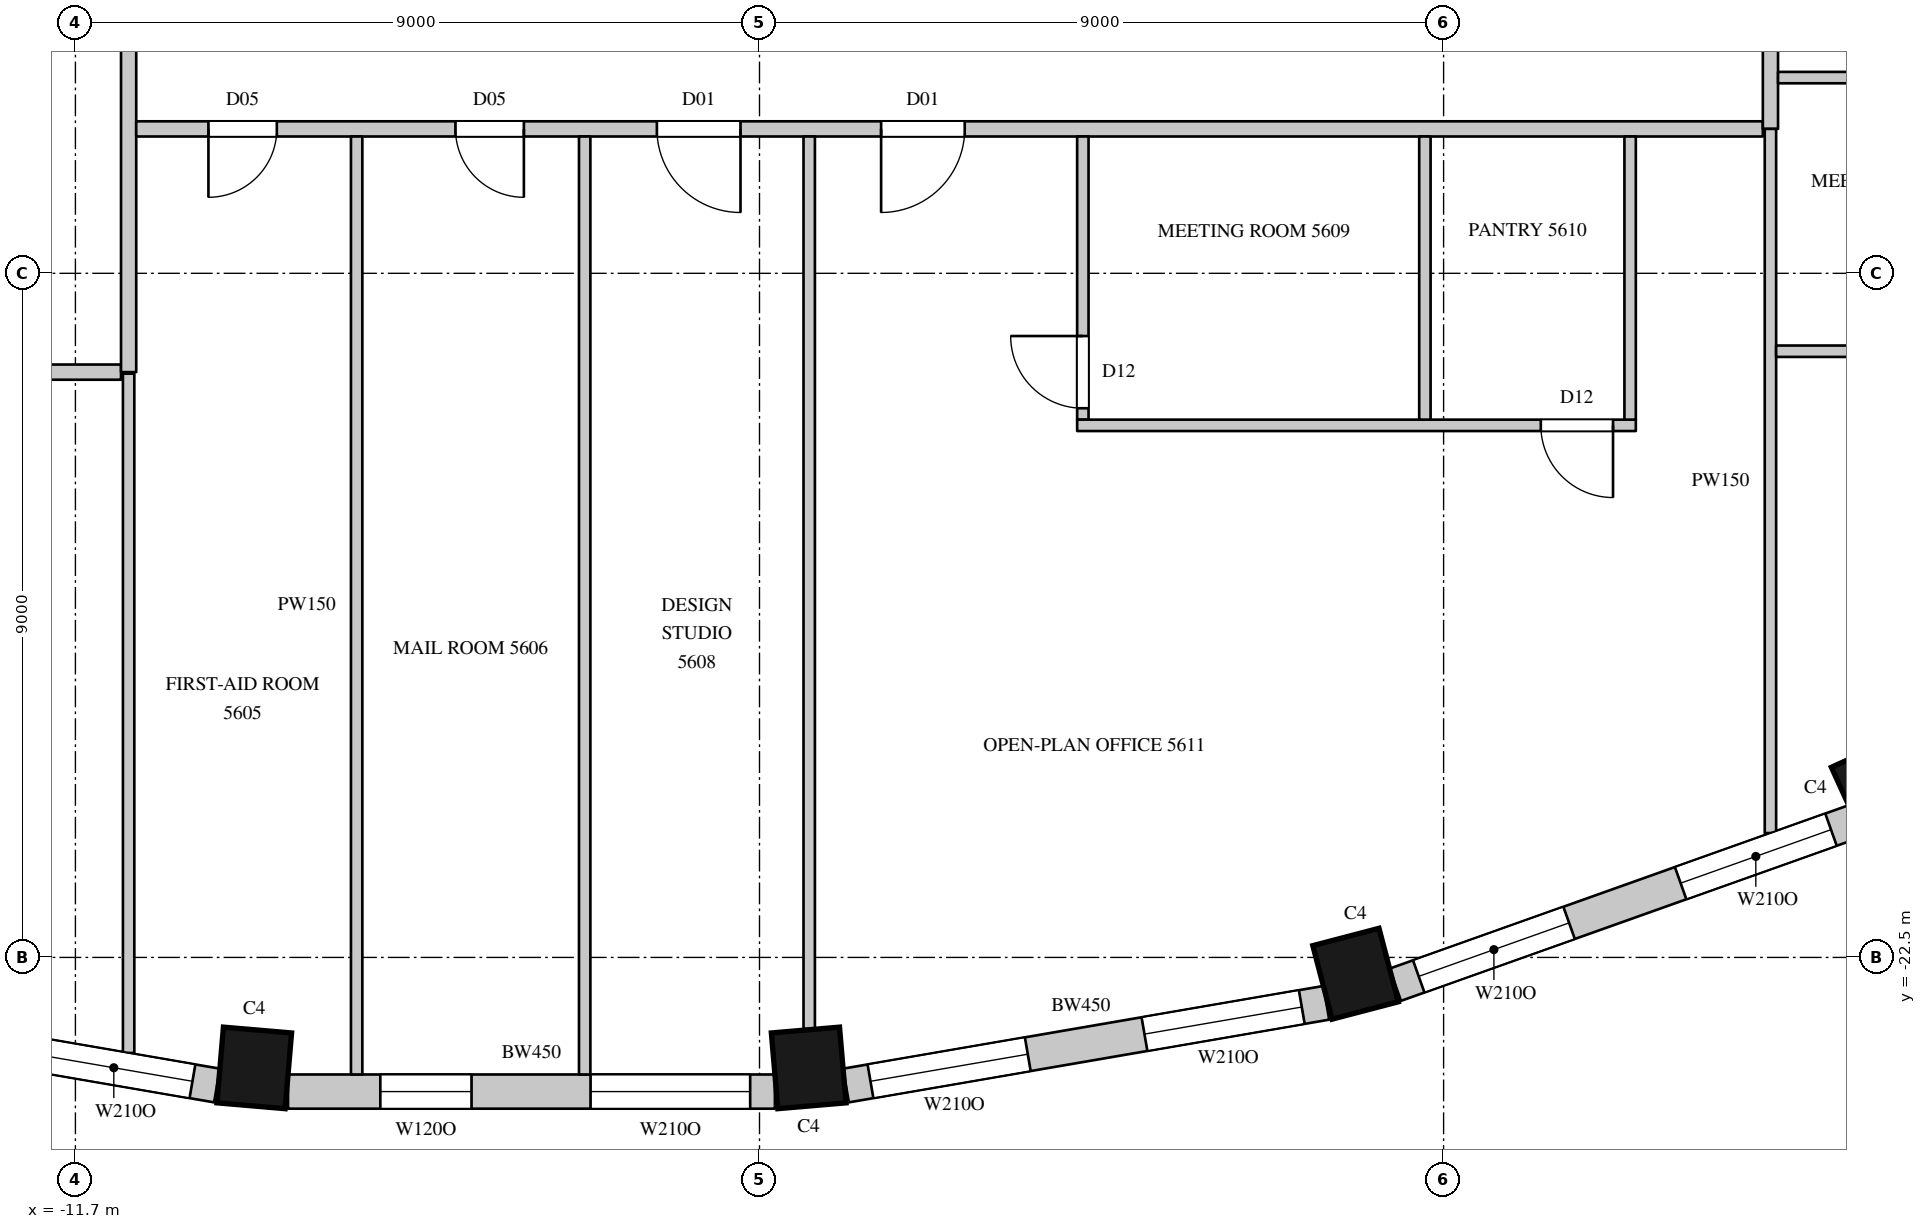
"""IFC4 building model, lengths in metres.
Left out: names, types, materials, properties, quantities, classifications, styles, units other than length and angle.
Written with IfcOpenShell. Run it as: python <this file> out.ifc"""

import sys

from ifc_helpers import new_model, si_unit, direction, frame, frame_2d, origin, origin_2d, place, context, subcontext, project, spatial, rectangle, extrude, element, fill, save


model = new_model("IFC4")
c1 = context("Model", 3, precision=1e-05, world=origin(), true_north=direction((0.0, 1.0)))
c2 = subcontext(c1, "Body", "Model", "MODEL_VIEW")
j1 = project(units=[si_unit("LENGTHUNIT", "METRE"), si_unit("PLANEANGLEUNIT", "RADIAN")], contexts=[c1])
p1 = place(None, origin())
s1 = spatial("IfcSite", under=j1, at=p1, CompositionType="ELEMENT")
p2 = place(p1, origin())
s2 = spatial("IfcBuilding", under=s1, at=p2, CompositionType="ELEMENT")
p3 = place(p2, frame((0.0, 0.0, 251.6)))
s3 = spatial("IfcBuildingStorey", under=s2, at=p3, CompositionType="ELEMENT", Elevation=251.6)
for number, where, z_axis, x_axis in (
    (1, (-9.347, -23.954, 0.0), (0.0, 0.0, 1.0), (0.996, -0.085, 0.0)),
    (2, (-2.053, -23.954, 0.0), (0.0, 0.0, 1.0), (0.996, 0.085, 0.0)),
    (3, (5.142, -22.715, 0.0), (0.0, 0.0, 1.0), (0.967, 0.253, 0.0)),
    (4, (12.019, -20.267, 0.0), (0.0, 0.0, 1.0), (0.91, 0.415, 0.0)),
):
    element("IfcColumn", number, at=place(p3, frame(where, z_axis=z_axis, x_axis=x_axis)), inside=s3, PredefinedType="COLUMN", context=c2, shape_type="SweptSolid", body=[
        extrude(rectangle(XDim=0.9, YDim=1.0, at=origin_2d()), origin(), (0.0, 0.0, 1.0), 4.1),
    ])
p4 = place(p3, frame((-16.157, -23.097, 0.0), z_axis=(0.0, 0.0, 1.0), x_axis=(0.985502073964, -0.169663379113, 0.0)))
e5 = element("IfcWall", 5, at=p4, inside=s3, PredefinedType="SOLIDWALL", context=c2, shape_type="SweptSolid", body=[
    extrude(rectangle(XDim=6.412, YDim=0.45, at=frame_2d((3.206, 0.0))), origin(), (0.0, 0.0, 1.0), 3.8),
])
p5 = place(p4, frame((0.327, 0.0, 1.05)))
e6 = element("IfcOpeningElement", 6, at=p5, cuts=e5, PredefinedType="OPENING", context=c2, shape_type="SweptSolid", body=[
    extrude(rectangle(XDim=2.1, YDim=2.4, at=frame_2d((1.05, 1.2))), frame((0.0, 0.235, 0.0), z_axis=(0.0, -1.0, 0.0), x_axis=(1.0, 0.0, 0.0)), (0.0, 0.0, 1.0), 0.47),
])
p6 = place(p4, frame((3.985, 0.0, 1.05)))
e7 = element("IfcOpeningElement", 7, at=p6, cuts=e5, PredefinedType="OPENING", context=c2, shape_type="SweptSolid", body=[
    extrude(rectangle(XDim=2.1, YDim=2.4, at=frame_2d((1.05, 1.2))), frame((0.0, 0.235, 0.0), z_axis=(0.0, -1.0, 0.0), x_axis=(1.0, 0.0, 0.0)), (0.0, 0.0, 1.0), 0.47),
])
p7 = place(p3, frame((-8.903, -24.265, 0.0), z_axis=(0.0, 0.0, 1.0), x_axis=(1.0, 0.0, 0.0)))
e8 = element("IfcWall", 8, at=p7, inside=s3, PredefinedType="SOLIDWALL", context=c2, shape_type="SweptSolid", body=[
    extrude(rectangle(XDim=6.406, YDim=0.45, at=frame_2d((3.203, 0.0))), origin(), (0.0, 0.0, 1.0), 3.8),
])
p8 = place(p7, frame((3.98, 0.0, 1.05)))
e9 = element("IfcOpeningElement", 9, at=p8, cuts=e8, PredefinedType="OPENING", context=c2, shape_type="SweptSolid", body=[
    extrude(rectangle(XDim=2.1, YDim=2.4, at=frame_2d((1.05, 1.2))), frame((0.0, 0.235, 0.0), z_axis=(0.0, -1.0, 0.0), x_axis=(1.0, 0.0, 0.0)), (0.0, 0.0, 1.0), 0.47),
])
p9 = place(p7, frame((1.214, 0.0, 1.05)))
e10 = element("IfcOpeningElement", 10, at=p9, cuts=e8, PredefinedType="OPENING", context=c2, shape_type="SweptSolid", body=[
    extrude(rectangle(XDim=1.2, YDim=2.4, at=frame_2d((0.6, 1.2))), frame((0.0, 0.235, 0.0), z_axis=(0.0, -1.0, 0.0), x_axis=(1.0, 0.0, 0.0)), (0.0, 0.0, 1.0), 0.47),
])
p10 = place(p3, frame((-1.562, -24.185, 0.0), z_axis=(0.0, 0.0, 1.0), x_axis=(0.985502073964, 0.169663379113, 0.0)))
e11 = element("IfcWall", 11, at=p10, inside=s3, PredefinedType="SOLIDWALL", context=c2, shape_type="SweptSolid", body=[
    extrude(rectangle(XDim=6.412, YDim=0.45, at=frame_2d((3.206, 0.0))), origin(), (0.0, 0.0, 1.0), 3.8),
])
p11 = place(p10, frame((0.327, 0.0, 1.05)))
e12 = element("IfcOpeningElement", 12, at=p11, cuts=e11, PredefinedType="OPENING", context=c2, shape_type="SweptSolid", body=[
    extrude(rectangle(XDim=2.1, YDim=2.4, at=frame_2d((1.05, 1.2))), frame((0.0, 0.235, 0.0), z_axis=(0.0, -1.0, 0.0), x_axis=(1.0, 0.0, 0.0)), (0.0, 0.0, 1.0), 0.47),
])
p12 = place(p10, frame((3.985, 0.0, 1.05)))
e13 = element("IfcOpeningElement", 13, at=p12, cuts=e11, PredefinedType="OPENING", context=c2, shape_type="SweptSolid", body=[
    extrude(rectangle(XDim=2.1, YDim=2.4, at=frame_2d((1.05, 1.2))), frame((0.0, 0.235, 0.0), z_axis=(0.0, -1.0, 0.0), x_axis=(1.0, 0.0, 0.0)), (0.0, 0.0, 1.0), 0.47),
])
p13 = place(p3, frame((5.665, -22.859, 0.0), z_axis=(0.0, 0.0, 1.0), x_axis=(0.942108340262, 0.335308626803, 0.0)))
e14 = element("IfcWall", 14, at=p13, inside=s3, PredefinedType="SOLIDWALL", context=c2, shape_type="SweptSolid", body=[
    extrude(rectangle(XDim=6.412, YDim=0.45, at=frame_2d((3.206, 0.0))), origin(), (0.0, 0.0, 1.0), 3.8),
])
p14 = place(p13, frame((0.327, 0.0, 1.05)))
e15 = element("IfcOpeningElement", 15, at=p14, cuts=e14, PredefinedType="OPENING", context=c2, shape_type="SweptSolid", body=[
    extrude(rectangle(XDim=2.1, YDim=2.4, at=frame_2d((1.05, 1.2))), frame((0.0, 0.235, 0.0), z_axis=(0.0, -1.0, 0.0), x_axis=(1.0, 0.0, 0.0)), (0.0, 0.0, 1.0), 0.47),
])
p15 = place(p13, frame((3.985, 0.0, 1.05)))
e16 = element("IfcOpeningElement", 16, at=p15, cuts=e14, PredefinedType="OPENING", context=c2, shape_type="SweptSolid", body=[
    extrude(rectangle(XDim=2.1, YDim=2.4, at=frame_2d((1.05, 1.2))), frame((0.0, 0.235, 0.0), z_axis=(0.0, -1.0, 0.0), x_axis=(1.0, 0.0, 0.0)), (0.0, 0.0, 1.0), 0.47),
])
p16 = place(p3, frame((-13.97, -14.8, 0.0), z_axis=(0.0, 0.0, 1.0), x_axis=(1.0, 0.0, 0.0)))
e17 = element("IfcWall", 17, at=p16, inside=s3, PredefinedType="PARTITIONING", context=c2, shape_type="SweptSolid", body=[
    extrude(rectangle(XDim=2.87, YDim=0.2, at=frame_2d((1.435, 0.0))), origin(), (0.0, 0.0, 1.0), 3.8),
])
p17 = place(p3, frame((-11.0, -14.8, 0.0), z_axis=(0.0, 0.0, 1.0), x_axis=(0.0, 1.0, 0.0)))
e18 = element("IfcWall", 18, at=p17, inside=s3, PredefinedType="PARTITIONING", context=c2, shape_type="SweptSolid", body=[
    extrude(rectangle(XDim=29.6, YDim=0.2, at=frame_2d((14.8, 0.0))), origin(), (0.0, 0.0, 1.0), 3.8),
])
p18 = place(p17, frame((14.35, 0.0, 0.0)))
e19 = element("IfcOpeningElement", 19, at=p18, cuts=e18, PredefinedType="OPENING", context=c2, shape_type="SweptSolid", body=[
    extrude(rectangle(XDim=1.5, YDim=2.4, at=frame_2d((0.75, 1.2))), frame((0.0, 0.11, 0.0), z_axis=(0.0, -1.0, 0.0), x_axis=(1.0, 0.0, 0.0)), (0.0, 0.0, 1.0), 0.22),
])
p19 = place(p3, frame((-10.9, -11.6, 0.0), z_axis=(0.0, 0.0, 1.0), x_axis=(1.0, 0.0, 0.0)))
e20 = element("IfcWall", 20, at=p19, inside=s3, PredefinedType="PARTITIONING", context=c2, shape_type="SweptSolid", body=[
    extrude(rectangle(XDim=21.4, YDim=0.2, at=frame_2d((10.7, 0.0))), origin(), (0.0, 0.0, 1.0), 3.8),
])
p20 = place(p19, frame((0.95, 0.0, 0.0)))
e21 = element("IfcOpeningElement", 21, at=p20, cuts=e20, PredefinedType="OPENING", context=c2, shape_type="SweptSolid", body=[
    extrude(rectangle(XDim=0.9, YDim=2.2, at=frame_2d((0.45, 1.1))), frame((0.0, 0.11, 0.0), z_axis=(0.0, -1.0, 0.0), x_axis=(1.0, 0.0, 0.0)), (0.0, 0.0, 1.0), 0.22),
])
p21 = place(p19, frame((4.2, 0.0, 0.0)))
e22 = element("IfcOpeningElement", 22, at=p21, cuts=e20, PredefinedType="OPENING", context=c2, shape_type="SweptSolid", body=[
    extrude(rectangle(XDim=0.9, YDim=2.2, at=frame_2d((0.45, 1.1))), frame((0.0, 0.11, 0.0), z_axis=(0.0, -1.0, 0.0), x_axis=(1.0, 0.0, 0.0)), (0.0, 0.0, 1.0), 0.22),
])
p22 = place(p19, frame((6.85, 0.0, 0.0)))
e23 = element("IfcOpeningElement", 23, at=p22, cuts=e20, PredefinedType="OPENING", context=c2, shape_type="SweptSolid", body=[
    extrude(rectangle(XDim=1.1, YDim=2.4, at=frame_2d((0.55, 1.2))), frame((0.0, 0.11, 0.0), z_axis=(0.0, -1.0, 0.0), x_axis=(1.0, 0.0, 0.0)), (0.0, 0.0, 1.0), 0.22),
])
p23 = place(p19, frame((9.8, 0.0, 0.0)))
e24 = element("IfcOpeningElement", 24, at=p23, cuts=e20, PredefinedType="OPENING", context=c2, shape_type="SweptSolid", body=[
    extrude(rectangle(XDim=1.1, YDim=2.4, at=frame_2d((0.55, 1.2))), frame((0.0, 0.11, 0.0), z_axis=(0.0, -1.0, 0.0), x_axis=(1.0, 0.0, 0.0)), (0.0, 0.0, 1.0), 0.22),
])
p24 = place(p3, frame((10.6, -11.6, 0.0), z_axis=(0.0, 0.0, 1.0), x_axis=(0.0, 1.0, 0.0)))
e25 = element("IfcWall", 25, at=p24, inside=s3, PredefinedType="PARTITIONING", context=c2, shape_type="SweptSolid", body=[
    extrude(rectangle(XDim=23.7, YDim=0.2, at=frame_2d((11.85, 0.0))), origin(), (0.0, 0.0, 1.0), 3.8),
])
p25 = place(p24, frame((9.45, 0.0, 0.0)))
e26 = element("IfcOpeningElement", 26, at=p25, cuts=e25, PredefinedType="OPENING", context=c2, shape_type="SweptSolid", body=[
    extrude(rectangle(XDim=1.5, YDim=2.4, at=frame_2d((0.75, 1.2))), frame((0.0, 0.11, 0.0), z_axis=(0.0, -1.0, 0.0), x_axis=(1.0, 0.0, 0.0)), (0.0, 0.0, 1.0), 0.22),
])
p26 = place(p24, frame((19.45, 0.0, 0.0)))
e27 = element("IfcOpeningElement", 27, at=p26, cuts=e25, PredefinedType="OPENING", context=c2, shape_type="SweptSolid", body=[
    extrude(rectangle(XDim=1.1, YDim=2.4, at=frame_2d((0.55, 1.2))), frame((0.0, 0.11, 0.0), z_axis=(0.0, -1.0, 0.0), x_axis=(1.0, 0.0, 0.0)), (0.0, 0.0, 1.0), 0.22),
])
p27 = place(p24, frame((4.6, 0.0, 0.0)))
e28 = element("IfcOpeningElement", 28, at=p27, cuts=e25, PredefinedType="OPENING", context=c2, shape_type="SweptSolid", body=[
    extrude(rectangle(XDim=1.1, YDim=2.4, at=frame_2d((0.55, 1.2))), frame((0.0, 0.11, 0.0), z_axis=(0.0, -1.0, 0.0), x_axis=(1.0, 0.0, 0.0)), (0.0, 0.0, 1.0), 0.22),
])
p28 = place(p3, frame((-11.0, -23.757, 0.0), z_axis=(0.0, 0.0, 1.0), x_axis=(0.0, 1.0, 0.0)))
e29 = element("IfcWall", 29, at=p28, inside=s3, PredefinedType="PARTITIONING", context=c2, shape_type="SweptSolid", body=[
    extrude(rectangle(XDim=8.937, YDim=0.15, at=frame_2d((4.468, 0.0))), origin(), (0.0, 0.0, 1.0), 3.8),
])
for number, where, z_axis, x_axis in (
    (30, (-8.0, -24.04, 0.0), (0.0, 0.0, 1.0), (0.0, 1.0, 0.0)),
    (31, (-5.0, -24.04, 0.0), (0.0, 0.0, 1.0), (0.0, 1.0, 0.0)),
):
    element("IfcWall", number, at=place(p3, frame(where, z_axis=z_axis, x_axis=x_axis)), inside=s3, PredefinedType="PARTITIONING", context=c2, shape_type="SweptSolid", body=[
        extrude(rectangle(XDim=12.34, YDim=0.15, at=frame_2d((6.17, 0.0))), origin(), (0.0, 0.0, 1.0), 3.8),
    ])
p29 = place(p3, frame((-2.046, -23.441, 0.0), z_axis=(0.0, 0.0, 1.0), x_axis=(0.0, 1.0, 0.0)))
e32 = element("IfcWall", 32, at=p29, inside=s3, PredefinedType="PARTITIONING", context=c2, shape_type="SweptSolid", body=[
    extrude(rectangle(XDim=11.741, YDim=0.15, at=frame_2d((5.871, 0.0))), origin(), (0.0, 0.0, 1.0), 3.8),
])
p30 = place(p3, frame((1.554, -15.425, 0.0), z_axis=(0.0, 0.0, 1.0), x_axis=(0.0, 1.0, 0.0)))
e33 = element("IfcWall", 33, at=p30, inside=s3, PredefinedType="PARTITIONING", context=c2, shape_type="SweptSolid", body=[
    extrude(rectangle(XDim=3.725, YDim=0.15, at=frame_2d((1.863, 0.0))), origin(), (0.0, 0.0, 1.0), 3.8),
])
p31 = place(p30, frame((0.15, 0.0, 0.0)))
e34 = element("IfcOpeningElement", 34, at=p31, cuts=e33, PredefinedType="OPENING", context=c2, shape_type="SweptSolid", body=[
    extrude(rectangle(XDim=0.95, YDim=2.2, at=frame_2d((0.475, 1.1))), frame((0.0, 0.085, 0.0), z_axis=(0.0, -1.0, 0.0), x_axis=(1.0, 0.0, 0.0)), (0.0, 0.0, 1.0), 0.17),
])
p32 = place(p3, frame((1.479, -15.5, 0.0), z_axis=(0.0, 0.0, 1.0), x_axis=(1.0, 0.0, 0.0)))
e35 = element("IfcWall", 35, at=p32, inside=s3, PredefinedType="PARTITIONING", context=c2, shape_type="SweptSolid", body=[
    extrude(rectangle(XDim=7.35, YDim=0.15, at=frame_2d((3.675, 0.0))), origin(), (0.0, 0.0, 1.0), 3.8),
])
p33 = place(p32, frame((6.1, 0.0, 0.0)))
e36 = element("IfcOpeningElement", 36, at=p33, cuts=e35, PredefinedType="OPENING", context=c2, shape_type="SweptSolid", body=[
    extrude(rectangle(XDim=0.95, YDim=2.2, at=frame_2d((0.475, 1.1))), frame((0.0, 0.085, 0.0), z_axis=(0.0, -1.0, 0.0), x_axis=(1.0, 0.0, 0.0)), (0.0, 0.0, 1.0), 0.17),
])
for number, where, z_axis, x_axis in (
    (37, (6.054, -15.425, 0.0), (0.0, 0.0, 1.0), (0.0, 1.0, 0.0)),
    (38, (8.754, -15.425, 0.0), (0.0, 0.0, 1.0), (0.0, 1.0, 0.0)),
):
    element("IfcWall", number, at=place(p3, frame(where, z_axis=z_axis, x_axis=x_axis)), inside=s3, PredefinedType="PARTITIONING", context=c2, shape_type="SweptSolid", body=[
        extrude(rectangle(XDim=3.725, YDim=0.15, at=frame_2d((1.863, 0.0))), origin(), (0.0, 0.0, 1.0), 3.8),
    ])
p34 = place(p3, frame((10.6, -20.864, 0.0), z_axis=(0.0, 0.0, 1.0), x_axis=(0.0, 1.0, 0.0)))
e39 = element("IfcWall", 39, at=p34, inside=s3, PredefinedType="PARTITIONING", context=c2, shape_type="SweptSolid", body=[
    extrude(rectangle(XDim=9.264, YDim=0.15, at=frame_2d((4.632, 0.0))), origin(), (0.0, 0.0, 1.0), 3.8),
])
p35 = place(p3, frame((10.675, -14.525, 0.0), z_axis=(0.0, 0.0, 1.0), x_axis=(1.0, 0.0, 0.0)))
e40 = element("IfcWall", 40, at=p35, inside=s3, PredefinedType="PARTITIONING", context=c2, shape_type="SweptSolid", body=[
    extrude(rectangle(XDim=3.6, YDim=0.15, at=frame_2d((1.8, 0.0))), origin(), (0.0, 0.0, 1.0), 3.8),
])
p36 = place(p35, frame((1.25, 0.0, 0.0)))
e41 = element("IfcOpeningElement", 41, at=p36, cuts=e40, PredefinedType="OPENING", context=c2, shape_type="SweptSolid", body=[
    extrude(rectangle(XDim=0.95, YDim=2.2, at=frame_2d((0.475, 1.1))), frame((0.0, 0.085, 0.0), z_axis=(0.0, -1.0, 0.0), x_axis=(1.0, 0.0, 0.0)), (0.0, 0.0, 1.0), 0.17),
])
p37 = place(p3, frame((10.7, -10.925, 0.0), z_axis=(0.0, 0.0, 1.0), x_axis=(1.0, 0.0, 0.0)))
e42 = element("IfcWall", 42, at=p37, inside=s3, PredefinedType="PARTITIONING", context=c2, shape_type="SweptSolid", body=[
    extrude(rectangle(XDim=3.425, YDim=0.15, at=frame_2d((1.712, 0.0))), origin(), (0.0, 0.0, 1.0), 3.8),
])
p38 = place(p6, origin())
e43 = element("IfcWindow", 43, at=p38, inside=s3, PartitioningType="SINGLE_PANEL", PredefinedType="WINDOW", context=c2, shape_type="SweptSolid", body=[
    extrude(rectangle(XDim=2.1, YDim=2.4, at=frame_2d((1.05, 1.2))), frame((0.0, 0.135, 0.0), z_axis=(0.0, -1.0, 0.0), x_axis=(1.0, 0.0, 0.0)), (0.0, 0.0, 1.0), 0.06),
])
fill(e7, e43)
p39 = place(p8, origin())
e44 = element("IfcWindow", 44, at=p39, inside=s3, PartitioningType="SINGLE_PANEL", PredefinedType="WINDOW", context=c2, shape_type="SweptSolid", body=[
    extrude(rectangle(XDim=2.1, YDim=2.4, at=frame_2d((1.05, 1.2))), frame((0.0, 0.135, 0.0), z_axis=(0.0, -1.0, 0.0), x_axis=(1.0, 0.0, 0.0)), (0.0, 0.0, 1.0), 0.06),
])
fill(e9, e44)
p40 = place(p11, origin())
e45 = element("IfcWindow", 45, at=p40, inside=s3, PartitioningType="SINGLE_PANEL", PredefinedType="WINDOW", context=c2, shape_type="SweptSolid", body=[
    extrude(rectangle(XDim=2.1, YDim=2.4, at=frame_2d((1.05, 1.2))), frame((0.0, 0.135, 0.0), z_axis=(0.0, -1.0, 0.0), x_axis=(1.0, 0.0, 0.0)), (0.0, 0.0, 1.0), 0.06),
])
fill(e12, e45)
p41 = place(p12, origin())
e46 = element("IfcWindow", 46, at=p41, inside=s3, PartitioningType="SINGLE_PANEL", PredefinedType="WINDOW", context=c2, shape_type="SweptSolid", body=[
    extrude(rectangle(XDim=2.1, YDim=2.4, at=frame_2d((1.05, 1.2))), frame((0.0, 0.135, 0.0), z_axis=(0.0, -1.0, 0.0), x_axis=(1.0, 0.0, 0.0)), (0.0, 0.0, 1.0), 0.06),
])
fill(e13, e46)
p42 = place(p14, origin())
e47 = element("IfcWindow", 47, at=p42, inside=s3, PartitioningType="SINGLE_PANEL", PredefinedType="WINDOW", context=c2, shape_type="SweptSolid", body=[
    extrude(rectangle(XDim=2.1, YDim=2.4, at=frame_2d((1.05, 1.2))), frame((0.0, 0.135, 0.0), z_axis=(0.0, -1.0, 0.0), x_axis=(1.0, 0.0, 0.0)), (0.0, 0.0, 1.0), 0.06),
])
fill(e15, e47)
p43 = place(p15, origin())
e48 = element("IfcWindow", 48, at=p43, inside=s3, PartitioningType="SINGLE_PANEL", PredefinedType="WINDOW", context=c2, shape_type="SweptSolid", body=[
    extrude(rectangle(XDim=2.1, YDim=2.4, at=frame_2d((1.05, 1.2))), frame((0.0, 0.135, 0.0), z_axis=(0.0, -1.0, 0.0), x_axis=(1.0, 0.0, 0.0)), (0.0, 0.0, 1.0), 0.06),
])
fill(e16, e48)
p44 = place(p20, origin())
e49 = element("IfcDoor", 49, at=p44, inside=s3, OperationType="SINGLE_SWING_RIGHT", PredefinedType="DOOR", context=c2, shape_type="SweptSolid", body=[
    extrude(rectangle(XDim=0.9, YDim=2.2, at=frame_2d((0.45, 1.1))), frame((0.0, 0.025, 0.0), z_axis=(0.0, -1.0, 0.0), x_axis=(1.0, 0.0, 0.0)), (0.0, 0.0, 1.0), 0.05),
])
fill(e21, e49)
p45 = place(p21, origin())
e50 = element("IfcDoor", 50, at=p45, inside=s3, OperationType="SINGLE_SWING_LEFT", PredefinedType="DOOR", context=c2, shape_type="SweptSolid", body=[
    extrude(rectangle(XDim=0.9, YDim=2.2, at=frame_2d((0.45, 1.1))), frame((0.0, 0.025, 0.0), z_axis=(0.0, -1.0, 0.0), x_axis=(1.0, 0.0, 0.0)), (0.0, 0.0, 1.0), 0.05),
])
fill(e22, e50)
p46 = place(p22, origin())
e51 = element("IfcDoor", 51, at=p46, inside=s3, OperationType="SINGLE_SWING_LEFT", PredefinedType="DOOR", context=c2, shape_type="SweptSolid", body=[
    extrude(rectangle(XDim=1.1, YDim=2.4, at=frame_2d((0.55, 1.2))), frame((0.0, 0.025, 0.0), z_axis=(0.0, -1.0, 0.0), x_axis=(1.0, 0.0, 0.0)), (0.0, 0.0, 1.0), 0.05),
])
fill(e23, e51)
p47 = place(p23, origin())
e52 = element("IfcDoor", 52, at=p47, inside=s3, OperationType="SINGLE_SWING_RIGHT", PredefinedType="DOOR", context=c2, shape_type="SweptSolid", body=[
    extrude(rectangle(XDim=1.1, YDim=2.4, at=frame_2d((0.55, 1.2))), frame((0.0, 0.025, 0.0), z_axis=(0.0, -1.0, 0.0), x_axis=(1.0, 0.0, 0.0)), (0.0, 0.0, 1.0), 0.05),
])
fill(e24, e52)
p48 = place(p31, origin())
e53 = element("IfcDoor", 53, at=p48, inside=s3, OperationType="SINGLE_SWING_RIGHT", PredefinedType="DOOR", context=c2, shape_type="SweptSolid", body=[
    extrude(rectangle(XDim=0.95, YDim=2.2, at=frame_2d((0.475, 1.1))), frame((0.0, 0.025, 0.0), z_axis=(0.0, -1.0, 0.0), x_axis=(1.0, 0.0, 0.0)), (0.0, 0.0, 1.0), 0.05),
])
fill(e34, e53)
p49 = place(p33, origin())
e54 = element("IfcDoor", 54, at=p49, inside=s3, OperationType="SINGLE_SWING_LEFT", PredefinedType="DOOR", context=c2, shape_type="SweptSolid", body=[
    extrude(rectangle(XDim=0.95, YDim=2.2, at=frame_2d((0.475, 1.1))), frame((0.0, 0.025, 0.0), z_axis=(0.0, -1.0, 0.0), x_axis=(1.0, 0.0, 0.0)), (0.0, 0.0, 1.0), 0.05),
])
fill(e36, e54)
p50 = place(p9, origin())
e55 = element("IfcWindow", 55, at=p50, inside=s3, PartitioningType="SINGLE_PANEL", PredefinedType="WINDOW", context=c2, shape_type="SweptSolid", body=[
    extrude(rectangle(XDim=1.2, YDim=2.4, at=frame_2d((0.6, 1.2))), frame((0.0, 0.135, 0.0), z_axis=(0.0, -1.0, 0.0), x_axis=(1.0, 0.0, 0.0)), (0.0, 0.0, 1.0), 0.06),
])
fill(e10, e55)
save(model, sys.argv[1])
